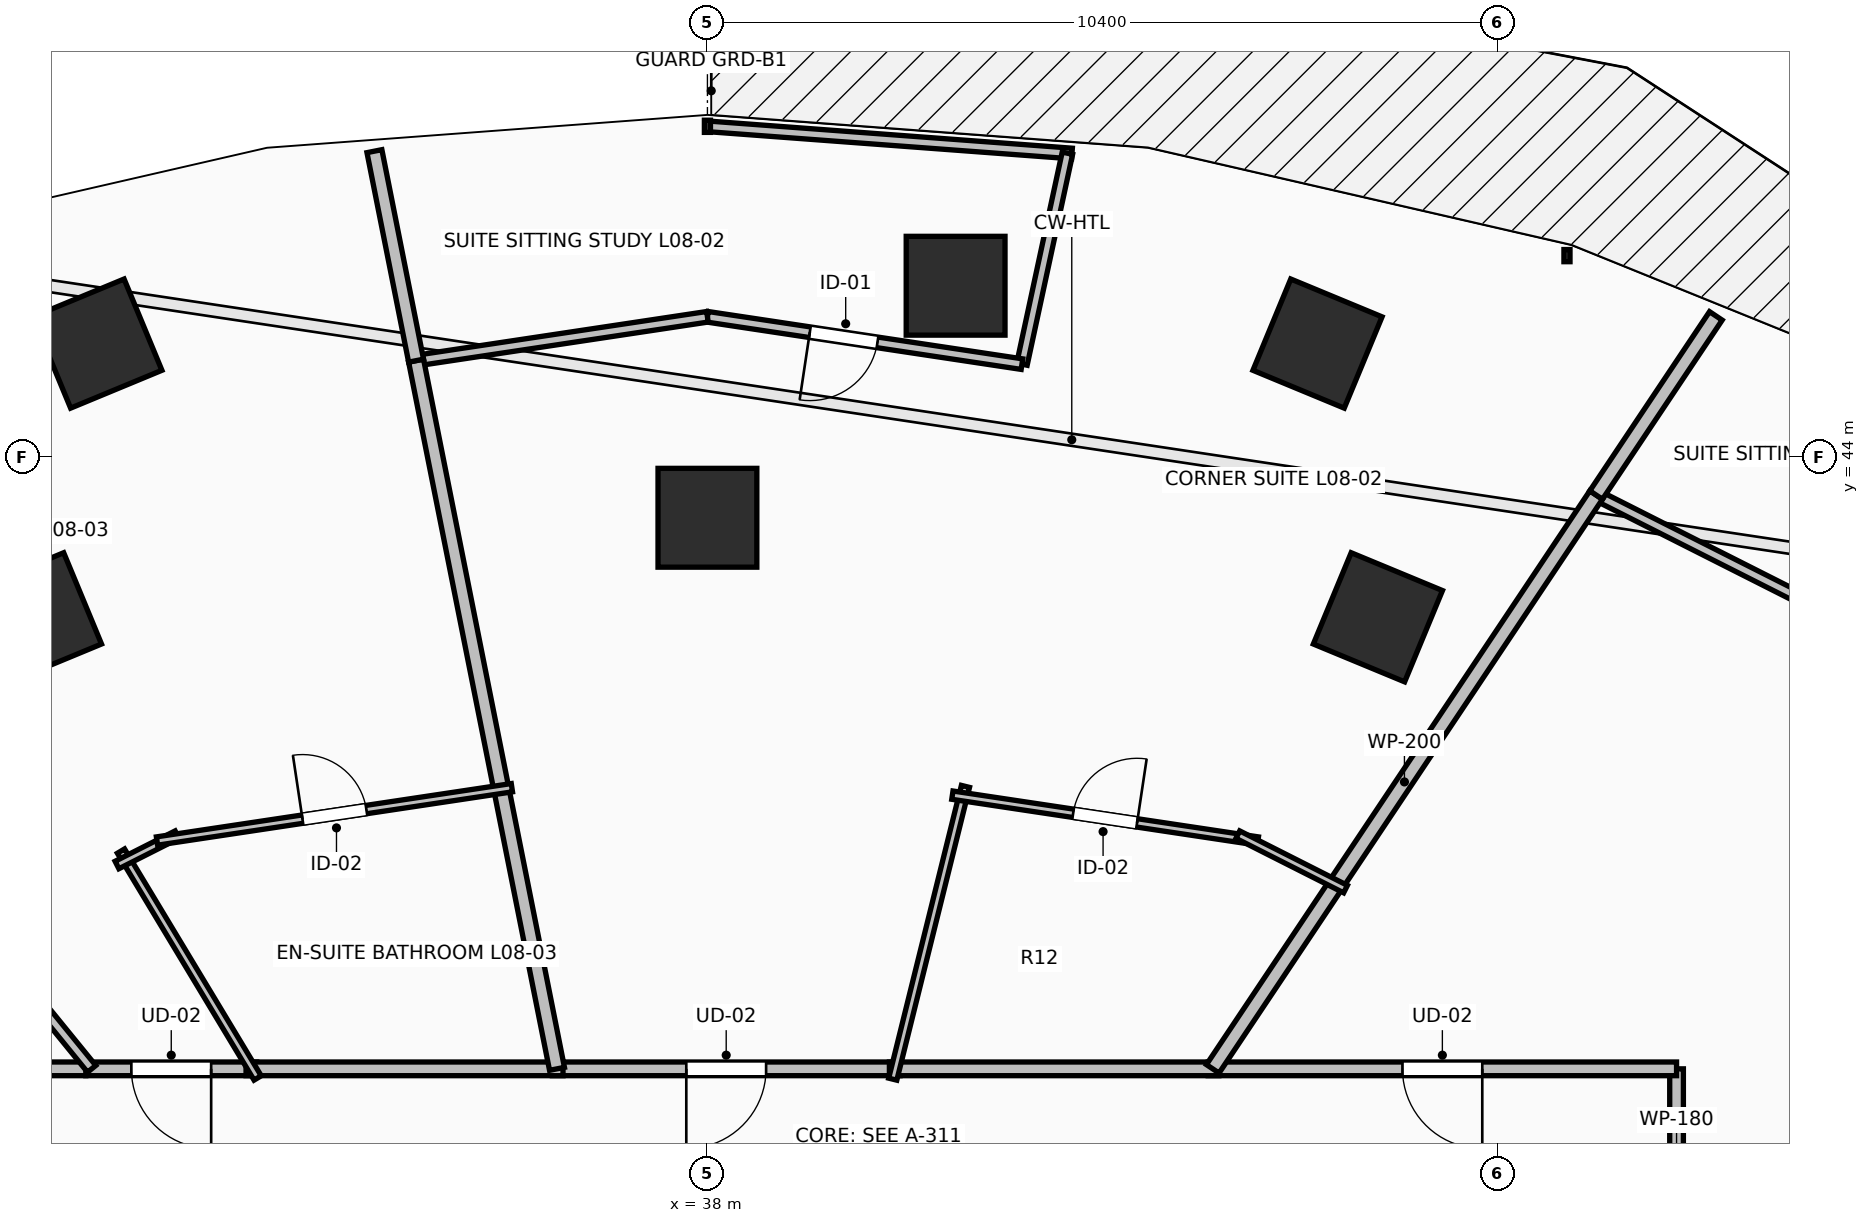
"""IFC4 building model, lengths in metres.
Left out: names, types, materials, properties, quantities, classifications, styles, units other than length and angle.
Written with IfcOpenShell. Run it as: python <this file> out.ifc"""

import sys

from ifc_helpers import new_model, si_unit, direction, frame, frame_2d, origin, origin_2d, place, context, subcontext, project, spatial, rectangle, extrude, element, fill, save


model = new_model("IFC4")
c1 = context("Model", 3, precision=1e-05, world=origin(), true_north=direction((0.0, 1.0)))
c2 = subcontext(c1, "Body", "Model", "MODEL_VIEW")
j1 = project(units=[si_unit("LENGTHUNIT", "METRE"), si_unit("PLANEANGLEUNIT", "RADIAN")], contexts=[c1])
p1 = place(None, origin())
s1 = spatial("IfcSite", under=j1, at=p1, CompositionType="ELEMENT")
p2 = place(p1, origin())
s2 = spatial("IfcBuilding", under=s1, at=p2, CompositionType="ELEMENT")
p3 = place(p2, frame((0.0, 0.0, 34.5)))
s3 = spatial("IfcBuildingStorey", under=s2, at=p3, CompositionType="ELEMENT", Elevation=34.5)
for number, where, z_axis, x_axis in (
    (1, (46.821, 41.891, 0.0), (0.0, 0.0, 1.0), (0.383, 0.924, 0.0)),
    (2, (38.0, 43.2, 0.0), (0.0, 0.0, 1.0), (0.0, 1.0, 0.0)),
    (3, (29.179, 41.891, 0.0), (0.0, 0.0, 1.0), (-0.383, 0.924, 0.0)),
    (4, (46.026, 45.492, 0.0), (0.0, 0.0, 1.0), (0.383, 0.924, 0.0)),
    (5, (41.265, 46.252, 0.0), (0.0, 0.0, 1.0), (0.0, 1.0, 0.0)),
    (6, (29.974, 45.492, 0.0), (0.0, 0.0, 1.0), (-0.383, 0.924, 0.0)),
):
    element("IfcColumn", number, at=place(p3, frame(where, z_axis=z_axis, x_axis=x_axis)), inside=s3, PredefinedType="COLUMN", context=c2, shape_type="SweptSolid", body=[
        extrude(rectangle(XDim=1.3, YDim=1.3, at=origin_2d()), origin(), (0.0, 0.0, 1.0), 3.5),
    ])
p4 = place(p3, frame((50.75, 33.616, 0.0), z_axis=(0.0, 0.0, 1.0), x_axis=(0.0, 1.0, 0.0)))
e7 = element("IfcWall", 7, at=p4, inside=s3, PredefinedType="PARTITIONING", context=c2, shape_type="SweptSolid", body=[
    extrude(rectangle(XDim=2.334, YDim=0.18, at=frame_2d((1.167, 0.0))), origin(), (0.0, 0.0, 1.0), 2.432),
])
p5 = place(p3, frame((50.75, 35.95, 0.0), z_axis=(0.0, 0.0, 1.0), x_axis=(-1.0, 0.0, 0.0)))
e8 = element("IfcWall", 8, at=p5, inside=s3, PredefinedType="PARTITIONING", context=c2, shape_type="SweptSolid", body=[
    extrude(rectangle(XDim=6.162, YDim=0.18, at=frame_2d((3.081, 0.0))), origin(), (0.0, 0.0, 1.0), 2.432),
])
p6 = place(p5, frame((2.556, 0.0, 0.0)))
e9 = element("IfcOpeningElement", 9, at=p6, cuts=e8, PredefinedType="OPENING", context=c2, shape_type="SweptSolid", body=[
    extrude(rectangle(XDim=1.05, YDim=2.2, at=frame_2d((0.525, 1.1))), frame((0.0, 0.105, 0.0), z_axis=(0.0, -1.0, 0.0), x_axis=(1.0, 0.0, 0.0)), (0.0, 0.0, 1.0), 0.21),
])
p7 = place(p3, frame((40.534, 35.95, 0.0), z_axis=(0.0, 0.0, 1.0), x_axis=(-1.0, 0.0, 0.0)))
e10 = element("IfcWall", 10, at=p7, inside=s3, PredefinedType="PARTITIONING", context=c2, shape_type="SweptSolid", body=[
    extrude(rectangle(XDim=4.574, YDim=0.18, at=frame_2d((2.287, 0.0))), origin(), (0.0, 0.0, 1.0), 3.24),
])
p8 = place(p7, frame((1.762, 0.0, 0.0)))
e11 = element("IfcOpeningElement", 11, at=p8, cuts=e10, PredefinedType="OPENING", context=c2, shape_type="SweptSolid", body=[
    extrude(rectangle(XDim=1.05, YDim=2.2, at=frame_2d((0.525, 1.1))), frame((0.0, 0.105, 0.0), z_axis=(0.0, -1.0, 0.0), x_axis=(1.0, 0.0, 0.0)), (0.0, 0.0, 1.0), 0.21),
])
p9 = place(p3, frame((44.728, 35.95, 0.0), z_axis=(0.0, 0.0, 1.0), x_axis=(-1.0, 0.0, 0.0)))
e12 = element("IfcWall", 12, at=p9, inside=s3, PredefinedType="PARTITIONING", context=c2, shape_type="SweptSolid", body=[
    extrude(rectangle(XDim=4.334, YDim=0.18, at=frame_2d((2.167, 0.0))), origin(), (0.0, 0.0, 1.0), 3.24),
])
p10 = place(p3, frame((32.07, 35.95, 0.0), z_axis=(0.0, 0.0, 1.0), x_axis=(-1.0, 0.0, 0.0)))
e13 = element("IfcWall", 13, at=p10, inside=s3, PredefinedType="PARTITIONING", context=c2, shape_type="SweptSolid", body=[
    extrude(rectangle(XDim=2.248, YDim=0.18, at=frame_2d((1.124, 0.0))), origin(), (0.0, 0.0, 1.0), 2.432),
])
p11 = place(p10, frame((0.599, 0.0, 0.0)))
e14 = element("IfcOpeningElement", 14, at=p11, cuts=e13, PredefinedType="OPENING", context=c2, shape_type="SweptSolid", body=[
    extrude(rectangle(XDim=1.05, YDim=2.2, at=frame_2d((0.525, 1.1))), frame((0.0, 0.105, 0.0), z_axis=(0.0, -1.0, 0.0), x_axis=(1.0, 0.0, 0.0)), (0.0, 0.0, 1.0), 0.21),
])
p12 = place(p3, frame((36.1, 35.95, 0.0), z_axis=(0.0, 0.0, 1.0), x_axis=(-1.0, 0.0, 0.0)))
e15 = element("IfcWall", 15, at=p12, inside=s3, PredefinedType="PARTITIONING", context=c2, shape_type="SweptSolid", body=[
    extrude(rectangle(XDim=4.17, YDim=0.18, at=frame_2d((2.085, 0.0))), origin(), (0.0, 0.0, 1.0), 3.24),
])
p13 = place(p3, frame((29.822, 35.95, 0.0), z_axis=(0.0, 0.0, 1.0), x_axis=(-1.0, 0.0, 0.0)))
e16 = element("IfcWall", 16, at=p13, inside=s3, PredefinedType="PARTITIONING", context=c2, shape_type="SweptSolid", body=[
    extrude(rectangle(XDim=4.572, YDim=0.18, at=frame_2d((2.286, 0.0))), origin(), (0.0, 0.0, 1.0), 2.432),
])
p14 = place(p13, frame((1.786, 0.0, 0.0)))
e17 = element("IfcOpeningElement", 17, at=p14, cuts=e16, PredefinedType="OPENING", context=c2, shape_type="SweptSolid", body=[
    extrude(rectangle(XDim=1.0, YDim=2.15, at=frame_2d((0.5, 1.075))), frame((0.0, 0.105, 0.0), z_axis=(0.0, -1.0, 0.0), x_axis=(1.0, 0.0, 0.0)), (0.0, 0.0, 1.0), 0.21),
])
p15 = place(p3, frame((56.554, 40.032, 0.0), z_axis=(0.0, 0.0, 1.0), x_axis=(-0.892545780062, 0.450956794487, 0.0)))
e18 = element("IfcWall", 18, at=p15, inside=s3, PredefinedType="PARTITIONING", context=c2, shape_type="SweptSolid", body=[
    extrude(rectangle(XDim=7.688, YDim=0.14, at=frame_2d((3.844, 0.0))), origin(), (0.0, 0.0, 1.0), 2.432),
])
p16 = place(p15, frame((3.394, 0.0, 0.0)))
e19 = element("IfcOpeningElement", 19, at=p16, cuts=e18, PredefinedType="OPENING", context=c2, shape_type="SweptSolid", body=[
    extrude(rectangle(XDim=0.9, YDim=2.1, at=frame_2d((0.45, 1.05))), frame((0.0, 0.085, 0.0), z_axis=(0.0, -1.0, 0.0), x_axis=(1.0, 0.0, 0.0)), (0.0, 0.0, 1.0), 0.17),
])
p17 = place(p3, frame((49.692, 43.499, 0.0), z_axis=(0.0, 0.0, 1.0), x_axis=(-0.555556259167, -0.831478949163, 0.0)))
e20 = element("IfcWall", 20, at=p17, inside=s3, PredefinedType="PARTITIONING", context=c2, shape_type="SweptSolid", body=[
    extrude(rectangle(XDim=9.079, YDim=0.2, at=frame_2d((4.54, 0.0))), origin(), (0.0, 0.0, 1.0), 2.432),
])
p18 = place(p3, frame((51.267, 45.856, 0.0), z_axis=(0.0, 0.0, 1.0), x_axis=(-0.555653789226, -0.831413775757, 0.0)))
e21 = element("IfcWall", 21, at=p18, inside=s3, PredefinedType="PARTITIONING", context=c2, shape_type="SweptSolid", body=[
    extrude(rectangle(XDim=2.835, YDim=0.2, at=frame_2d((1.417, 0.0))), origin(), (0.0, 0.0, 1.0), 2.624),
])
p19 = place(p3, frame((40.438, 35.814, 0.0), z_axis=(0.0, 0.0, 1.0), x_axis=(0.24101554649, 0.970521254971, 0.0)))
e22 = element("IfcWall", 22, at=p19, inside=s3, PredefinedType="PARTITIONING", context=c2, shape_type="SweptSolid", body=[
    extrude(rectangle(XDim=3.969, YDim=0.11, at=frame_2d((1.984, 0.0))), origin(), (0.0, 0.0, 1.0), 2.972),
])
p20 = place(p3, frame((41.223, 39.551, 0.0), z_axis=(0.0, 0.0, 1.0), x_axis=(0.988911221338, -0.148507899833, 0.0)))
e23 = element("IfcWall", 23, at=p20, inside=s3, PredefinedType="PARTITIONING", context=c2, shape_type="SweptSolid", body=[
    extrude(rectangle(XDim=4.064, YDim=0.11, at=frame_2d((2.032, 0.0))), origin(), (0.0, 0.0, 1.0), 3.24),
])
p21 = place(p20, frame((1.607, 0.0, 0.0)))
e24 = element("IfcOpeningElement", 24, at=p21, cuts=e23, PredefinedType="OPENING", context=c2, shape_type="SweptSolid", body=[
    extrude(rectangle(XDim=0.85, YDim=2.1, at=frame_2d((0.425, 1.05))), frame((0.0, 0.07, 0.0), z_axis=(0.0, -1.0, 0.0), x_axis=(1.0, 0.0, 0.0)), (0.0, 0.0, 1.0), 0.14),
])
p22 = place(p3, frame((44.978, 39.031, 0.0), z_axis=(0.0, 0.0, 1.0), x_axis=(0.892388427115, -0.451268096758, 0.0)))
e25 = element("IfcWall", 25, at=p22, inside=s3, PredefinedType="PARTITIONING", context=c2, shape_type="SweptSolid", body=[
    extrude(rectangle(XDim=1.588, YDim=0.11, at=frame_2d((0.794, 0.0))), origin(), (0.0, 0.0, 1.0), 3.24),
])
p23 = place(p3, frame((42.796, 47.992, 0.0), z_axis=(0.0, 0.0, 1.0), x_axis=(-0.99722311136, 0.074471915311, 0.0)))
e26 = element("IfcWall", 26, at=p23, inside=s3, PredefinedType="PARTITIONING", context=c2, shape_type="SweptSolid", body=[
    extrude(rectangle(XDim=4.809, YDim=0.14, at=frame_2d((2.405, 0.0))), origin(), (0.0, 0.0, 1.0), 3.24),
])
p24 = place(p3, frame((42.736, 47.996, 0.0), z_axis=(0.0, 0.0, 1.0), x_axis=(-0.210697687201, -0.977551269555, 0.0)))
e27 = element("IfcWall", 27, at=p24, inside=s3, PredefinedType="PARTITIONING", context=c2, shape_type="SweptSolid", body=[
    extrude(rectangle(XDim=2.839, YDim=0.14, at=frame_2d((1.419, 0.0))), origin(), (0.0, 0.0, 1.0), 2.624),
])
p25 = place(p3, frame((42.138, 45.221, 0.0), z_axis=(0.0, 0.0, 1.0), x_axis=(-0.988853606593, 0.148891049857, 0.0)))
e28 = element("IfcWall", 28, at=p25, inside=s3, PredefinedType="PARTITIONING", context=c2, shape_type="SweptSolid", body=[
    extrude(rectangle(XDim=4.185, YDim=0.14, at=frame_2d((2.092, 0.0))), origin(), (0.0, 0.0, 1.0), 2.432),
])
p26 = place(p25, frame((1.922, 0.0, 0.0)))
e29 = element("IfcOpeningElement", 29, at=p26, cuts=e28, PredefinedType="OPENING", context=c2, shape_type="SweptSolid", body=[
    extrude(rectangle(XDim=0.9, YDim=2.1, at=frame_2d((0.45, 1.05))), frame((0.0, 0.085, 0.0), z_axis=(0.0, -1.0, 0.0), x_axis=(1.0, 0.0, 0.0)), (0.0, 0.0, 1.0), 0.17),
])
p27 = place(p3, frame((38.0, 45.844, 0.0), z_axis=(0.0, 0.0, 1.0), x_axis=(-0.988862311426, -0.148833225599, 0.0)))
e30 = element("IfcWall", 30, at=p27, inside=s3, PredefinedType="PARTITIONING", context=c2, shape_type="SweptSolid", body=[
    extrude(rectangle(XDim=3.876, YDim=0.14, at=frame_2d((1.938, 0.0))), origin(), (0.0, 0.0, 1.0), 2.624),
])
p28 = place(p3, frame((34.167, 45.267, 0.0), z_axis=(0.0, 0.0, 1.0), x_axis=(0.19516219459, -0.980770981322, 0.0)))
e31 = element("IfcWall", 31, at=p28, inside=s3, PredefinedType="PARTITIONING", context=c2, shape_type="SweptSolid", body=[
    extrude(rectangle(XDim=9.5, YDim=0.2, at=frame_2d((4.75, 0.0))), origin(), (0.0, 0.0, 1.0), 2.432),
])
p29 = place(p3, frame((33.619, 48.023, 0.0), z_axis=(0.0, 0.0, 1.0), x_axis=(0.195063341769, -0.980790646722, 0.0)))
e32 = element("IfcWall", 32, at=p29, inside=s3, PredefinedType="PARTITIONING", context=c2, shape_type="SweptSolid", body=[
    extrude(rectangle(XDim=2.81, YDim=0.2, at=frame_2d((1.405, 0.0))), origin(), (0.0, 0.0, 1.0), 2.624),
])
p30 = place(p3, frame((32.082, 35.83, 0.0), z_axis=(0.0, 0.0, 1.0), x_axis=(-0.51585529038, 0.856675737597, 0.0)))
e33 = element("IfcWall", 33, at=p30, inside=s3, PredefinedType="PARTITIONING", context=c2, shape_type="SweptSolid", body=[
    extrude(rectangle(XDim=3.484, YDim=0.11, at=frame_2d((1.742, 0.0))), origin(), (0.0, 0.0, 1.0), 2.432),
])
p31 = place(p3, frame((30.232, 38.632, 0.0), z_axis=(0.0, 0.0, 1.0), x_axis=(0.892376579336, 0.451291525129, 0.0)))
e34 = element("IfcWall", 34, at=p31, inside=s3, PredefinedType="PARTITIONING", context=c2, shape_type="SweptSolid", body=[
    extrude(rectangle(XDim=0.885, YDim=0.11, at=frame_2d((0.442, 0.0))), origin(), (0.0, 0.0, 1.0), 3.24),
])
p32 = place(p3, frame((30.759, 38.947, 0.0), z_axis=(0.0, 0.0, 1.0), x_axis=(0.9889029502, 0.148562966739, 0.0)))
e35 = element("IfcWall", 35, at=p32, inside=s3, PredefinedType="PARTITIONING", context=c2, shape_type="SweptSolid", body=[
    extrude(rectangle(XDim=4.721, YDim=0.11, at=frame_2d((2.361, 0.0))), origin(), (0.0, 0.0, 1.0), 2.432),
])
p33 = place(p32, frame((1.936, 0.0, 0.0)))
e36 = element("IfcOpeningElement", 36, at=p33, cuts=e35, PredefinedType="OPENING", context=c2, shape_type="SweptSolid", body=[
    extrude(rectangle(XDim=0.85, YDim=2.1, at=frame_2d((0.425, 1.05))), frame((0.0, 0.07, 0.0), z_axis=(0.0, -1.0, 0.0), x_axis=(1.0, 0.0, 0.0)), (0.0, 0.0, 1.0), 0.14),
])
p34 = place(p3, frame((27.791, 38.54, 0.0), z_axis=(0.0, 0.0, 1.0), x_axis=(0.631217195835, -0.775606118904, 0.0)))
e37 = element("IfcWall", 37, at=p34, inside=s3, PredefinedType="PARTITIONING", context=c2, shape_type="SweptSolid", body=[
    extrude(rectangle(XDim=3.339, YDim=0.14, at=frame_2d((1.67, 0.0))), origin(), (0.0, 0.0, 1.0), 2.432),
])
p35 = place(p6, origin())
e38 = element("IfcDoor", 38, at=p35, inside=s3, OperationType="SINGLE_SWING_LEFT", PredefinedType="DOOR", context=c2, shape_type="SweptSolid", body=[
    extrude(rectangle(XDim=1.05, YDim=2.2, at=frame_2d((0.525, 1.1))), frame((0.0, 0.025, 0.0), z_axis=(0.0, -1.0, 0.0), x_axis=(1.0, 0.0, 0.0)), (0.0, 0.0, 1.0), 0.05),
])
fill(e9, e38)
p36 = place(p8, origin())
e39 = element("IfcDoor", 39, at=p36, inside=s3, OperationType="SINGLE_SWING_RIGHT", PredefinedType="DOOR", context=c2, shape_type="SweptSolid", body=[
    extrude(rectangle(XDim=1.05, YDim=2.2, at=frame_2d((0.525, 1.1))), frame((0.0, 0.025, 0.0), z_axis=(0.0, -1.0, 0.0), x_axis=(1.0, 0.0, 0.0)), (0.0, 0.0, 1.0), 0.05),
])
fill(e11, e39)
p37 = place(p11, origin())
e40 = element("IfcDoor", 40, at=p37, inside=s3, OperationType="SINGLE_SWING_LEFT", PredefinedType="DOOR", context=c2, shape_type="SweptSolid", body=[
    extrude(rectangle(XDim=1.05, YDim=2.2, at=frame_2d((0.525, 1.1))), frame((0.0, 0.025, 0.0), z_axis=(0.0, -1.0, 0.0), x_axis=(1.0, 0.0, 0.0)), (0.0, 0.0, 1.0), 0.05),
])
fill(e14, e40)
p38 = place(p21, origin())
e41 = element("IfcDoor", 41, at=p38, inside=s3, OperationType="SINGLE_SWING_RIGHT", PredefinedType="DOOR", context=c2, shape_type="SweptSolid", body=[
    extrude(rectangle(XDim=0.85, YDim=2.1, at=frame_2d((0.425, 1.05))), frame((0.0, 0.025, 0.0), z_axis=(0.0, -1.0, 0.0), x_axis=(1.0, 0.0, 0.0)), (0.0, 0.0, 1.0), 0.05),
])
fill(e24, e41)
p39 = place(p26, origin())
e42 = element("IfcDoor", 42, at=p39, inside=s3, OperationType="SINGLE_SWING_RIGHT", PredefinedType="DOOR", context=c2, shape_type="SweptSolid", body=[
    extrude(rectangle(XDim=0.9, YDim=2.1, at=frame_2d((0.45, 1.05))), frame((0.0, 0.025, 0.0), z_axis=(0.0, -1.0, 0.0), x_axis=(1.0, 0.0, 0.0)), (0.0, 0.0, 1.0), 0.05),
])
fill(e29, e42)
p40 = place(p33, origin())
e43 = element("IfcDoor", 43, at=p40, inside=s3, OperationType="SINGLE_SWING_LEFT", PredefinedType="DOOR", context=c2, shape_type="SweptSolid", body=[
    extrude(rectangle(XDim=0.85, YDim=2.1, at=frame_2d((0.425, 1.05))), frame((0.0, 0.025, 0.0), z_axis=(0.0, -1.0, 0.0), x_axis=(1.0, 0.0, 0.0)), (0.0, 0.0, 1.0), 0.05),
])
fill(e36, e43)
save(model, sys.argv[1])
